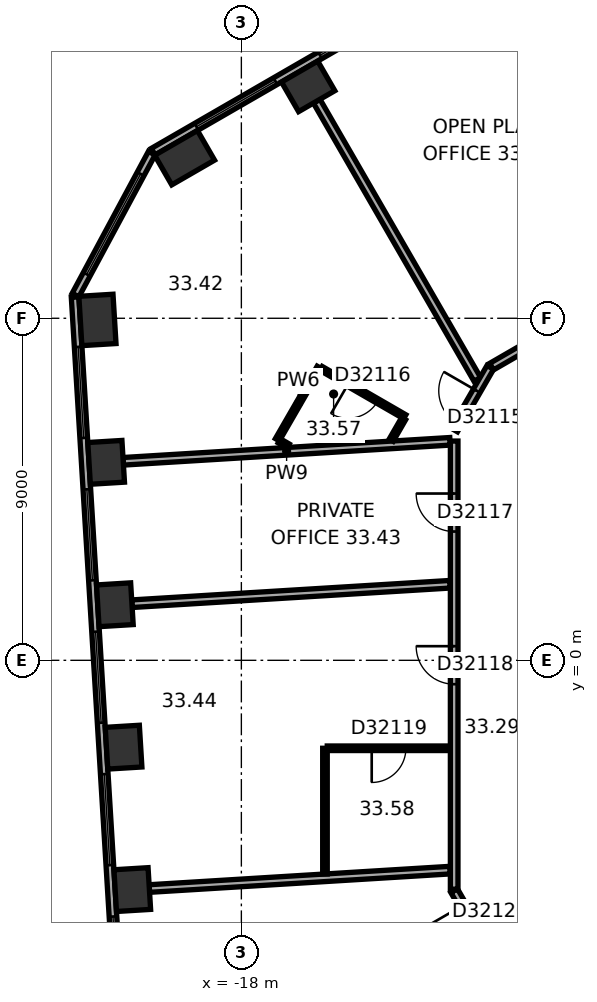
"""IFC4 building model, lengths in metres.
Left out: names, types, materials, properties, quantities, classifications, styles, units other than length and angle.
Written with IfcOpenShell. Run it as: python <this file> out.ifc"""

import sys

from ifc_helpers import new_model, si_unit, direction, frame, frame_2d, origin, origin_2d, place, context, subcontext, project, spatial, rectangle, extrude, element, fill, save


model = new_model("IFC4")
c1 = context("Model", 3, precision=1e-05, world=origin(), true_north=direction((0.0, 1.0)))
c2 = subcontext(c1, "Body", "Model", "MODEL_VIEW")
j1 = project(units=[si_unit("LENGTHUNIT", "METRE"), si_unit("PLANEANGLEUNIT", "RADIAN")], contexts=[c1])
p1 = place(None, origin())
s1 = spatial("IfcSite", under=j1, at=p1, CompositionType="ELEMENT")
p2 = place(p1, origin())
s2 = spatial("IfcBuilding", under=s1, at=p2, CompositionType="ELEMENT")
p3 = place(p2, frame((0.0, 0.0, 135.5)))
s3 = spatial("IfcBuildingStorey", under=s2, at=p3, CompositionType="ELEMENT", Elevation=135.5)
p4 = place(p3, frame((-16.242, 15.102, 0.0), z_axis=(0.0, 0.0, 1.0), x_axis=(-0.866025403784, -0.5, 0.0)))
e1 = element("IfcColumn", 1, at=p4, inside=s3, PredefinedType="COLUMN", context=c2, shape_type="SweptSolid", body=[
    extrude(rectangle(XDim=1.1, YDim=0.9, at=origin_2d()), origin(), (0.0, 0.0, 1.0), 3.7),
])
for number, where, z_axis, x_axis in (
    (2, (-19.494, 13.225, 0.0), (0.0, 0.0, 1.0), (-0.866, -0.5, 0.0)),
    (3, (-21.787, 8.956, 0.0), (0.0, 0.0, 1.0), (0.061, -0.998, 0.0)),
):
    element("IfcColumn", number, at=place(p3, frame(where, z_axis=z_axis, x_axis=x_axis)), inside=s3, PredefinedType="COLUMN", context=c2, shape_type="SweptSolid", body=[
        extrude(rectangle(XDim=1.3, YDim=0.9, at=origin_2d()), origin(), (0.0, 0.0, 1.0), 3.7),
    ])
for number, where, z_axis, x_axis in (
    (4, (-21.558, 5.209, 0.0), (0.0, 0.0, 1.0), (0.061, -0.998, 0.0)),
    (5, (-21.329, 1.462, 0.0), (0.0, 0.0, 1.0), (0.061, -0.998, 0.0)),
    (6, (-21.1, -2.285, 0.0), (0.0, 0.0, 1.0), (0.061, -0.998, 0.0)),
    (7, (-20.871, -6.032, 0.0), (0.0, 0.0, 1.0), (0.061, -0.998, 0.0)),
):
    element("IfcColumn", number, at=place(p3, frame(where, z_axis=z_axis, x_axis=x_axis)), inside=s3, PredefinedType="COLUMN", context=c2, shape_type="SweptSolid", body=[
        extrude(rectangle(XDim=1.1, YDim=0.9, at=origin_2d()), origin(), (0.0, 0.0, 1.0), 3.7),
    ])
p5 = place(p3, frame((-2.961, 23.405, 0.0), z_axis=(0.0, 0.0, 1.0), x_axis=(-0.866023315909, -0.500003616288, 0.0)))
e8 = element("IfcWall", 8, at=p5, inside=s3, PredefinedType="STANDARD", context=c2, shape_type="SweptSolid", body=[
    extrude(rectangle(XDim=20.044, YDim=0.2, at=frame_2d((10.022, 0.0))), origin(), (0.0, 0.0, 1.0), 3.7),
])
p6 = place(p5, frame((1.314, 0.0, 0.9)))
e9 = element("IfcOpeningElement", 9, at=p6, cuts=e8, PredefinedType="OPENING", context=c2, shape_type="SweptSolid", body=[
    extrude(rectangle(XDim=2.4, YDim=2.0, at=frame_2d((1.2, 1.0))), frame((0.0, 0.11, 0.0), z_axis=(0.0, -1.0, 0.0), x_axis=(1.0, 0.0, 0.0)), (0.0, 0.0, 1.0), 0.22),
])
p7 = place(p5, frame((5.069, 0.0, 0.9)))
e10 = element("IfcOpeningElement", 10, at=p7, cuts=e8, PredefinedType="OPENING", context=c2, shape_type="SweptSolid", body=[
    extrude(rectangle(XDim=2.4, YDim=2.0, at=frame_2d((1.2, 1.0))), frame((0.0, 0.11, 0.0), z_axis=(0.0, -1.0, 0.0), x_axis=(1.0, 0.0, 0.0)), (0.0, 0.0, 1.0), 0.22),
])
p8 = place(p5, frame((8.823, 0.0, 0.9)))
e11 = element("IfcOpeningElement", 11, at=p8, cuts=e8, PredefinedType="OPENING", context=c2, shape_type="SweptSolid", body=[
    extrude(rectangle(XDim=2.4, YDim=2.0, at=frame_2d((1.2, 1.0))), frame((0.0, 0.11, 0.0), z_axis=(0.0, -1.0, 0.0), x_axis=(1.0, 0.0, 0.0)), (0.0, 0.0, 1.0), 0.22),
])
p9 = place(p5, frame((12.577, 0.0, 0.9)))
e12 = element("IfcOpeningElement", 12, at=p9, cuts=e8, PredefinedType="OPENING", context=c2, shape_type="SweptSolid", body=[
    extrude(rectangle(XDim=2.4, YDim=2.0, at=frame_2d((1.2, 1.0))), frame((0.0, 0.11, 0.0), z_axis=(0.0, -1.0, 0.0), x_axis=(1.0, 0.0, 0.0)), (0.0, 0.0, 1.0), 0.22),
])
p10 = place(p5, frame((16.331, 0.0, 0.9)))
e13 = element("IfcOpeningElement", 13, at=p10, cuts=e8, PredefinedType="OPENING", context=c2, shape_type="SweptSolid", body=[
    extrude(rectangle(XDim=2.4, YDim=2.0, at=frame_2d((1.2, 1.0))), frame((0.0, 0.11, 0.0), z_axis=(0.0, -1.0, 0.0), x_axis=(1.0, 0.0, 0.0)), (0.0, 0.0, 1.0), 0.22),
])
p11 = place(p3, frame((-20.357, 13.344, 0.0), z_axis=(0.0, 0.0, 1.0), x_axis=(-0.473288913494, -0.880907262068, 0.0)))
e14 = element("IfcWall", 14, at=p11, inside=s3, PredefinedType="STANDARD", context=c2, shape_type="SweptSolid", body=[
    extrude(rectangle(XDim=4.238, YDim=0.2, at=frame_2d((2.119, 0.0))), origin(), (0.0, 0.0, 1.0), 3.7),
])
p12 = place(p11, frame((0.619, 0.0, 0.9)))
e15 = element("IfcOpeningElement", 15, at=p12, cuts=e14, PredefinedType="OPENING", context=c2, shape_type="SweptSolid", body=[
    extrude(rectangle(XDim=3.0, YDim=2.0, at=frame_2d((1.5, 1.0))), frame((0.0, 0.11, 0.0), z_axis=(0.0, -1.0, 0.0), x_axis=(1.0, 0.0, 0.0)), (0.0, 0.0, 1.0), 0.22),
])
p13 = place(p3, frame((-22.375, 9.557, 0.0), z_axis=(0.0, 0.0, 1.0), x_axis=(0.061036015339, -0.998135564356, 0.0)))
e16 = element("IfcWall", 16, at=p13, inside=s3, PredefinedType="STANDARD", context=c2, shape_type="SweptSolid", body=[
    extrude(rectangle(XDim=20.044, YDim=0.2, at=frame_2d((10.022, 0.0))), origin(), (0.0, 0.0, 1.0), 3.7),
])
p14 = place(p13, frame((1.313, 0.0, 0.9)))
e17 = element("IfcOpeningElement", 17, at=p14, cuts=e16, PredefinedType="OPENING", context=c2, shape_type="SweptSolid", body=[
    extrude(rectangle(XDim=2.4, YDim=2.0, at=frame_2d((1.2, 1.0))), frame((0.0, 0.11, 0.0), z_axis=(0.0, -1.0, 0.0), x_axis=(1.0, 0.0, 0.0)), (0.0, 0.0, 1.0), 0.22),
])
p15 = place(p13, frame((5.067, 0.0, 0.9)))
e18 = element("IfcOpeningElement", 18, at=p15, cuts=e16, PredefinedType="OPENING", context=c2, shape_type="SweptSolid", body=[
    extrude(rectangle(XDim=2.4, YDim=2.0, at=frame_2d((1.2, 1.0))), frame((0.0, 0.11, 0.0), z_axis=(0.0, -1.0, 0.0), x_axis=(1.0, 0.0, 0.0)), (0.0, 0.0, 1.0), 0.22),
])
p16 = place(p13, frame((8.821, 0.0, 0.9)))
e19 = element("IfcOpeningElement", 19, at=p16, cuts=e16, PredefinedType="OPENING", context=c2, shape_type="SweptSolid", body=[
    extrude(rectangle(XDim=2.4, YDim=2.0, at=frame_2d((1.2, 1.0))), frame((0.0, 0.11, 0.0), z_axis=(0.0, -1.0, 0.0), x_axis=(1.0, 0.0, 0.0)), (0.0, 0.0, 1.0), 0.22),
])
p17 = place(p13, frame((12.575, 0.0, 0.9)))
e20 = element("IfcOpeningElement", 20, at=p17, cuts=e16, PredefinedType="OPENING", context=c2, shape_type="SweptSolid", body=[
    extrude(rectangle(XDim=2.4, YDim=2.0, at=frame_2d((1.2, 1.0))), frame((0.0, 0.11, 0.0), z_axis=(0.0, -1.0, 0.0), x_axis=(1.0, 0.0, 0.0)), (0.0, 0.0, 1.0), 0.22),
])
p18 = place(p13, frame((16.329, 0.0, 0.9)))
e21 = element("IfcOpeningElement", 21, at=p18, cuts=e16, PredefinedType="OPENING", context=c2, shape_type="SweptSolid", body=[
    extrude(rectangle(XDim=2.4, YDim=2.0, at=frame_2d((1.2, 1.0))), frame((0.0, 0.11, 0.0), z_axis=(0.0, -1.0, 0.0), x_axis=(1.0, 0.0, 0.0)), (0.0, 0.0, 1.0), 0.22),
])
p19 = place(p3, frame((-21.109, 5.237, 0.0), z_axis=(0.0, 0.0, 1.0), x_axis=(0.998135264293, 0.061040922131, 0.0)))
e22 = element("IfcWall", 22, at=p19, inside=s3, PredefinedType="PARTITIONING", context=c2, shape_type="SweptSolid", body=[
    extrude(rectangle(XDim=8.615, YDim=0.2, at=frame_2d((4.308, 0.0))), origin(), (0.0, 0.0, 1.0), 3.35),
])
p20 = place(p3, frame((-20.88, 1.49, 0.0), z_axis=(0.0, 0.0, 1.0), x_axis=(0.998136393419, 0.061022455974, 0.0)))
e23 = element("IfcWall", 23, at=p20, inside=s3, PredefinedType="PARTITIONING", context=c2, shape_type="SweptSolid", body=[
    extrude(rectangle(XDim=8.386, YDim=0.2, at=frame_2d((4.193, 0.0))), origin(), (0.0, 0.0, 1.0), 2.55),
])
p21 = place(p3, frame((-20.421, -6.005, 0.0), z_axis=(0.0, 0.0, 1.0), x_axis=(0.998134865741, 0.061047438866, 0.0)))
e24 = element("IfcWall", 24, at=p21, inside=s3, PredefinedType="PARTITIONING", context=c2, shape_type="SweptSolid", body=[
    extrude(rectangle(XDim=7.927, YDim=0.2, at=frame_2d((3.963, 0.0))), origin(), (0.0, 0.0, 1.0), 2.55),
])
p22 = place(p3, frame((-17.052, 5.804, 0.0), z_axis=(0.0, 0.0, 1.0), x_axis=(0.50002983664, 0.866008176907, 0.0)))
e25 = element("IfcWall", 25, at=p22, inside=s3, PredefinedType="PARTITIONING", context=c2, shape_type="SweptSolid", body=[
    extrude(rectangle(XDim=2.2, YDim=0.12, at=frame_2d((1.1, 0.0))), origin(), (0.0, 0.0, 1.0), 3.35),
])
p23 = place(p3, frame((-16.769, 5.64, 0.0), z_axis=(0.0, 0.0, 1.0), x_axis=(-0.865926680471, 0.500170954823, 0.0)))
e26 = element("IfcWall", 26, at=p23, inside=s3, PredefinedType="PARTITIONING", context=c2, shape_type="SweptSolid", body=[
    extrude(rectangle(XDim=0.267, YDim=0.12, at=frame_2d((0.134, 0.0))), origin(), (0.0, 0.0, 1.0), 3.35),
])
p24 = place(p3, frame((-16.018, 14.712, 0.0), z_axis=(0.0, 0.0, 1.0), x_axis=(0.500000843414, -0.866024916838, 0.0)))
e27 = element("IfcWall", 27, at=p24, inside=s3, PredefinedType="PARTITIONING", context=c2, shape_type="SweptSolid", body=[
    extrude(rectangle(XDim=8.452, YDim=0.2, at=frame_2d((4.226, 0.0))), origin(), (0.0, 0.0, 1.0), 3.35),
])
p25 = place(p3, frame((-15.9, 7.679, 0.0), z_axis=(0.0, 0.0, 1.0), x_axis=(0.866022320763, -0.500005339912, 0.0)))
e28 = element("IfcWall", 28, at=p25, inside=s3, PredefinedType="PARTITIONING", context=c2, shape_type="SweptSolid", body=[
    extrude(rectangle(XDim=2.54, YDim=0.12, at=frame_2d((1.27, 0.0))), origin(), (0.0, 0.0, 1.0), 3.35),
])
p26 = place(p25, frame((0.82, 0.0, 0.0)))
e29 = element("IfcOpeningElement", 29, at=p26, cuts=e28, PredefinedType="OPENING", context=c2, shape_type="SweptSolid", body=[
    extrude(rectangle(XDim=0.9, YDim=2.1, at=frame_2d((0.45, 1.05))), frame((0.0, 0.07, 0.0), z_axis=(0.0, -1.0, 0.0), x_axis=(1.0, 0.0, 0.0)), (0.0, 0.0, 1.0), 0.14),
])
p27 = place(p3, frame((-15.8, -5.622, 0.0), z_axis=(0.0, 0.0, 1.0), x_axis=(0.0, 1.0, 0.0)))
e30 = element("IfcWall", 30, at=p27, inside=s3, PredefinedType="PARTITIONING", context=c2, shape_type="SweptSolid", body=[
    extrude(rectangle(XDim=3.308, YDim=0.12, at=frame_2d((1.654, 0.0))), origin(), (0.0, 0.0, 1.0), 3.35),
])
p28 = place(p3, frame((-15.74, -2.314, 0.0), z_axis=(0.0, 0.0, 1.0), x_axis=(1.0, 0.0, 0.0)))
e31 = element("IfcWall", 31, at=p28, inside=s3, PredefinedType="PARTITIONING", context=c2, shape_type="SweptSolid", body=[
    extrude(rectangle(XDim=3.24, YDim=0.12, at=frame_2d((1.62, 0.0))), origin(), (0.0, 0.0, 1.0), 3.35),
])
p29 = place(p28, frame((1.17, 0.0, 0.0)))
e32 = element("IfcOpeningElement", 32, at=p29, cuts=e31, PredefinedType="OPENING", context=c2, shape_type="SweptSolid", body=[
    extrude(rectangle(XDim=0.9, YDim=2.1, at=frame_2d((0.45, 1.05))), frame((0.0, 0.07, 0.0), z_axis=(0.0, -1.0, 0.0), x_axis=(1.0, 0.0, 0.0)), (0.0, 0.0, 1.0), 0.14),
])
p30 = place(p3, frame((-13.731, 6.357, 0.0), z_axis=(0.0, 0.0, 1.0), x_axis=(-0.500090215447, -0.865973311606, 0.0)))
e33 = element("IfcWall", 33, at=p30, inside=s3, PredefinedType="PARTITIONING", context=c2, shape_type="SweptSolid", body=[
    extrude(rectangle(XDim=0.651, YDim=0.12, at=frame_2d((0.326, 0.0))), origin(), (0.0, 0.0, 1.0), 3.35),
])
p31 = place(p3, frame((-12.4, -6.062, 0.0), z_axis=(0.0, 0.0, 1.0), x_axis=(0.500022797313, -0.86601224135, 0.0)))
e34 = element("IfcWall", 34, at=p31, inside=s3, PredefinedType="PARTITIONING", context=c2, shape_type="SweptSolid", body=[
    extrude(rectangle(XDim=1.9, YDim=0.2, at=frame_2d((0.95, 0.0))), origin(), (0.0, 0.0, 1.0), 3.35),
])
p32 = place(p31, frame((0.45, 0.0, 0.0)))
e35 = element("IfcOpeningElement", 35, at=p32, cuts=e34, PredefinedType="OPENING", context=c2, shape_type="SweptSolid", body=[
    extrude(rectangle(XDim=1.0, YDim=2.1, at=frame_2d((0.5, 1.05))), frame((0.0, 0.11, 0.0), z_axis=(0.0, -1.0, 0.0), x_axis=(1.0, 0.0, 0.0)), (0.0, 0.0, 1.0), 0.22),
])
p33 = place(p3, frame((-12.4, 5.769, 0.0), z_axis=(0.0, 0.0, 1.0), x_axis=(0.0, -1.0, 0.0)))
e36 = element("IfcWall", 36, at=p33, inside=s3, PredefinedType="PARTITIONING", context=c2, shape_type="SweptSolid", body=[
    extrude(rectangle(XDim=11.792, YDim=0.2, at=frame_2d((5.896, 0.0))), origin(), (0.0, 0.0, 1.0), 3.35),
])
p34 = place(p33, frame((1.381, 0.0, 0.0)))
e37 = element("IfcOpeningElement", 37, at=p34, cuts=e36, PredefinedType="OPENING", context=c2, shape_type="SweptSolid", body=[
    extrude(rectangle(XDim=1.0, YDim=2.1, at=frame_2d((0.5, 1.05))), frame((0.0, 0.11, 0.0), z_axis=(0.0, -1.0, 0.0), x_axis=(1.0, 0.0, 0.0)), (0.0, 0.0, 1.0), 0.22),
])
p35 = place(p33, frame((5.397, 0.0, 0.0)))
e38 = element("IfcOpeningElement", 38, at=p35, cuts=e36, PredefinedType="OPENING", context=c2, shape_type="SweptSolid", body=[
    extrude(rectangle(XDim=1.0, YDim=2.1, at=frame_2d((0.5, 1.05))), frame((0.0, 0.11, 0.0), z_axis=(0.0, -1.0, 0.0), x_axis=(1.0, 0.0, 0.0)), (0.0, 0.0, 1.0), 0.22),
])
p36 = place(p3, frame((-11.45, 7.708, 0.0), z_axis=(0.0, 0.0, 1.0), x_axis=(-0.500022797313, -0.86601224135, 0.0)))
e39 = element("IfcWall", 39, at=p36, inside=s3, PredefinedType="PARTITIONING", context=c2, shape_type="SweptSolid", body=[
    extrude(rectangle(XDim=1.9, YDim=0.2, at=frame_2d((0.95, 0.0))), origin(), (0.0, 0.0, 1.0), 3.35),
])
p37 = place(p36, frame((0.712, 0.0, 0.0)))
e40 = element("IfcOpeningElement", 40, at=p37, cuts=e39, PredefinedType="OPENING", context=c2, shape_type="SweptSolid", body=[
    extrude(rectangle(XDim=1.0, YDim=2.1, at=frame_2d((0.5, 1.05))), frame((0.0, 0.11, 0.0), z_axis=(0.0, -1.0, 0.0), x_axis=(1.0, 0.0, 0.0)), (0.0, 0.0, 1.0), 0.22),
])
p38 = place(p3, frame((-4.209, 11.888, 0.0), z_axis=(0.0, 0.0, 1.0), x_axis=(-0.866020930448, -0.500007747966, 0.0)))
e41 = element("IfcWall", 41, at=p38, inside=s3, PredefinedType="PARTITIONING", context=c2, shape_type="SweptSolid", body=[
    extrude(rectangle(XDim=8.321, YDim=0.2, at=frame_2d((4.161, 0.0))), origin(), (0.0, 0.0, 1.0), 3.35),
])
p39 = place(p38, frame((5.439, 0.0, 0.0)))
e42 = element("IfcOpeningElement", 42, at=p39, cuts=e41, PredefinedType="OPENING", context=c2, shape_type="SweptSolid", body=[
    extrude(rectangle(XDim=1.0, YDim=2.1, at=frame_2d((0.5, 1.05))), frame((0.0, 0.11, 0.0), z_axis=(0.0, -1.0, 0.0), x_axis=(1.0, 0.0, 0.0)), (0.0, 0.0, 1.0), 0.22),
])
p40 = place(p9, origin())
e43 = element("IfcWindow", 43, at=p40, inside=s3, PartitioningType="SINGLE_PANEL", PredefinedType="WINDOW", context=c2, shape_type="SweptSolid", body=[
    extrude(rectangle(XDim=2.4, YDim=2.0, at=frame_2d((1.2, 1.0))), frame((0.0, 0.03, 0.0), z_axis=(0.0, -1.0, 0.0), x_axis=(1.0, 0.0, 0.0)), (0.0, 0.0, 1.0), 0.06),
])
fill(e12, e43)
p41 = place(p10, origin())
e44 = element("IfcWindow", 44, at=p41, inside=s3, PartitioningType="SINGLE_PANEL", PredefinedType="WINDOW", context=c2, shape_type="SweptSolid", body=[
    extrude(rectangle(XDim=2.4, YDim=2.0, at=frame_2d((1.2, 1.0))), frame((0.0, 0.03, 0.0), z_axis=(0.0, -1.0, 0.0), x_axis=(1.0, 0.0, 0.0)), (0.0, 0.0, 1.0), 0.06),
])
fill(e13, e44)
p42 = place(p12, origin())
e45 = element("IfcWindow", 45, at=p42, inside=s3, PartitioningType="SINGLE_PANEL", PredefinedType="WINDOW", context=c2, shape_type="SweptSolid", body=[
    extrude(rectangle(XDim=3.0, YDim=2.0, at=frame_2d((1.5, 1.0))), frame((0.0, 0.03, 0.0), z_axis=(0.0, -1.0, 0.0), x_axis=(1.0, 0.0, 0.0)), (0.0, 0.0, 1.0), 0.06),
])
fill(e15, e45)
p43 = place(p14, origin())
e46 = element("IfcWindow", 46, at=p43, inside=s3, PartitioningType="SINGLE_PANEL", PredefinedType="WINDOW", context=c2, shape_type="SweptSolid", body=[
    extrude(rectangle(XDim=2.4, YDim=2.0, at=frame_2d((1.2, 1.0))), frame((0.0, 0.03, 0.0), z_axis=(0.0, -1.0, 0.0), x_axis=(1.0, 0.0, 0.0)), (0.0, 0.0, 1.0), 0.06),
])
fill(e17, e46)
p44 = place(p15, origin())
e47 = element("IfcWindow", 47, at=p44, inside=s3, PartitioningType="SINGLE_PANEL", PredefinedType="WINDOW", context=c2, shape_type="SweptSolid", body=[
    extrude(rectangle(XDim=2.4, YDim=2.0, at=frame_2d((1.2, 1.0))), frame((0.0, 0.03, 0.0), z_axis=(0.0, -1.0, 0.0), x_axis=(1.0, 0.0, 0.0)), (0.0, 0.0, 1.0), 0.06),
])
fill(e18, e47)
p45 = place(p16, origin())
e48 = element("IfcWindow", 48, at=p45, inside=s3, PartitioningType="SINGLE_PANEL", PredefinedType="WINDOW", context=c2, shape_type="SweptSolid", body=[
    extrude(rectangle(XDim=2.4, YDim=2.0, at=frame_2d((1.2, 1.0))), frame((0.0, 0.03, 0.0), z_axis=(0.0, -1.0, 0.0), x_axis=(1.0, 0.0, 0.0)), (0.0, 0.0, 1.0), 0.06),
])
fill(e19, e48)
p46 = place(p17, origin())
e49 = element("IfcWindow", 49, at=p46, inside=s3, PartitioningType="SINGLE_PANEL", PredefinedType="WINDOW", context=c2, shape_type="SweptSolid", body=[
    extrude(rectangle(XDim=2.4, YDim=2.0, at=frame_2d((1.2, 1.0))), frame((0.0, 0.03, 0.0), z_axis=(0.0, -1.0, 0.0), x_axis=(1.0, 0.0, 0.0)), (0.0, 0.0, 1.0), 0.06),
])
fill(e20, e49)
p47 = place(p18, origin())
e50 = element("IfcWindow", 50, at=p47, inside=s3, PartitioningType="SINGLE_PANEL", PredefinedType="WINDOW", context=c2, shape_type="SweptSolid", body=[
    extrude(rectangle(XDim=2.4, YDim=2.0, at=frame_2d((1.2, 1.0))), frame((0.0, 0.03, 0.0), z_axis=(0.0, -1.0, 0.0), x_axis=(1.0, 0.0, 0.0)), (0.0, 0.0, 1.0), 0.06),
])
fill(e21, e50)
p48 = place(p37, origin())
e51 = element("IfcDoor", 51, at=p48, inside=s3, OperationType="SINGLE_SWING_LEFT", PredefinedType="DOOR", context=c2, shape_type="SweptSolid", body=[
    extrude(rectangle(XDim=1.0, YDim=2.1, at=frame_2d((0.5, 1.05))), frame((0.0, 0.025, 0.0), z_axis=(0.0, -1.0, 0.0), x_axis=(1.0, 0.0, 0.0)), (0.0, 0.0, 1.0), 0.05),
])
fill(e40, e51)
p49 = place(p26, origin())
e52 = element("IfcDoor", 52, at=p49, inside=s3, OperationType="SINGLE_SWING_LEFT", PredefinedType="DOOR", context=c2, shape_type="SweptSolid", body=[
    extrude(rectangle(XDim=0.9, YDim=2.1, at=frame_2d((0.45, 1.05))), frame((0.0, 0.025, 0.0), z_axis=(0.0, -1.0, 0.0), x_axis=(1.0, 0.0, 0.0)), (0.0, 0.0, 1.0), 0.05),
])
fill(e29, e52)
p50 = place(p34, origin())
e53 = element("IfcDoor", 53, at=p50, inside=s3, OperationType="SINGLE_SWING_LEFT", PredefinedType="DOOR", context=c2, shape_type="SweptSolid", body=[
    extrude(rectangle(XDim=1.0, YDim=2.1, at=frame_2d((0.5, 1.05))), frame((0.0, 0.025, 0.0), z_axis=(0.0, -1.0, 0.0), x_axis=(1.0, 0.0, 0.0)), (0.0, 0.0, 1.0), 0.05),
])
fill(e37, e53)
p51 = place(p35, origin())
e54 = element("IfcDoor", 54, at=p51, inside=s3, OperationType="SINGLE_SWING_LEFT", PredefinedType="DOOR", context=c2, shape_type="SweptSolid", body=[
    extrude(rectangle(XDim=1.0, YDim=2.1, at=frame_2d((0.5, 1.05))), frame((0.0, 0.025, 0.0), z_axis=(0.0, -1.0, 0.0), x_axis=(1.0, 0.0, 0.0)), (0.0, 0.0, 1.0), 0.05),
])
fill(e38, e54)
p52 = place(p29, origin())
e55 = element("IfcDoor", 55, at=p52, inside=s3, OperationType="SINGLE_SWING_LEFT", PredefinedType="DOOR", context=c2, shape_type="SweptSolid", body=[
    extrude(rectangle(XDim=0.9, YDim=2.1, at=frame_2d((0.45, 1.05))), frame((0.0, 0.025, 0.0), z_axis=(0.0, -1.0, 0.0), x_axis=(1.0, 0.0, 0.0)), (0.0, 0.0, 1.0), 0.05),
])
fill(e32, e55)
p53 = place(p32, origin())
e56 = element("IfcDoor", 56, at=p53, inside=s3, OperationType="SINGLE_SWING_LEFT", PredefinedType="DOOR", context=c2, shape_type="SweptSolid", body=[
    extrude(rectangle(XDim=1.0, YDim=2.1, at=frame_2d((0.5, 1.05))), frame((0.0, 0.025, 0.0), z_axis=(0.0, -1.0, 0.0), x_axis=(1.0, 0.0, 0.0)), (0.0, 0.0, 1.0), 0.05),
])
fill(e35, e56)
save(model, sys.argv[1])
